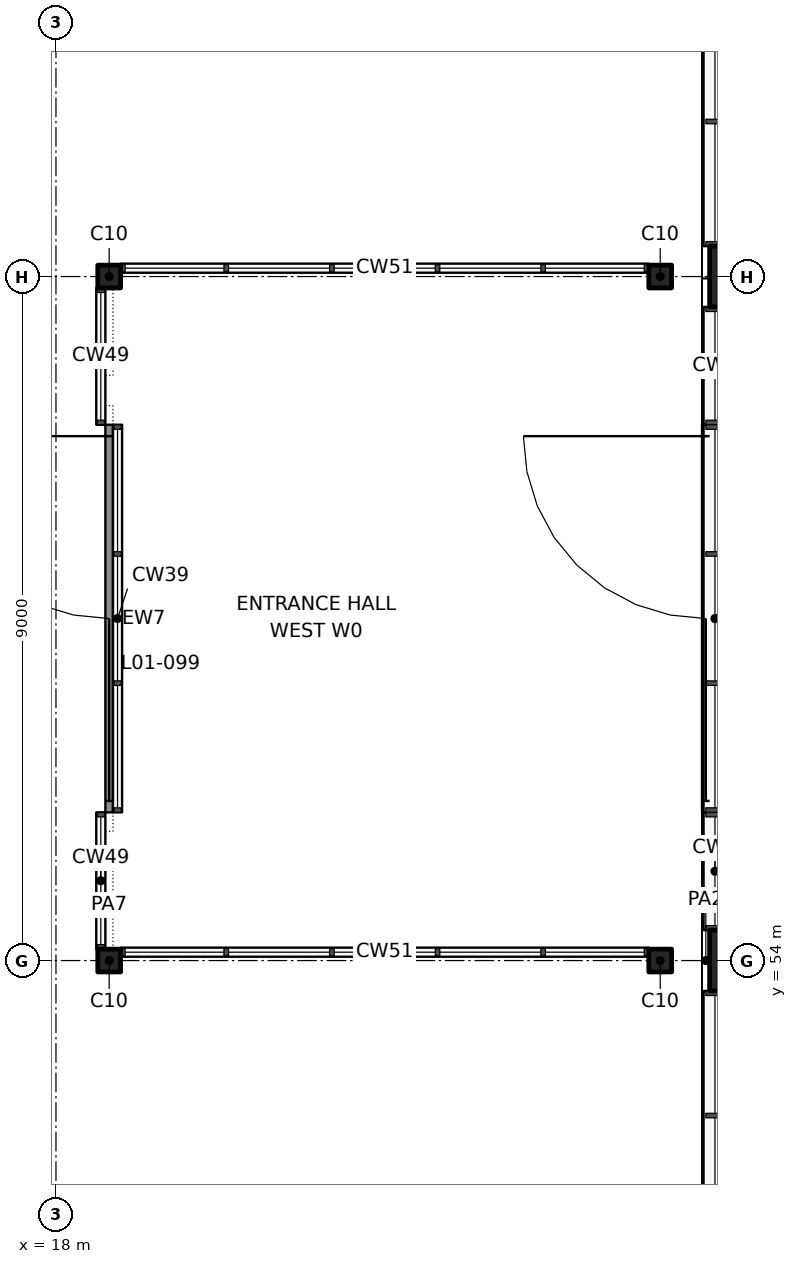
"""IFC4 building model, lengths in metres.
Left out: names, types, materials, properties, quantities, classifications, styles, units other than length and angle.
Written with IfcOpenShell. Run it as: python <this file> out.ifc"""

import sys

from ifc_helpers import new_model, si_unit, direction, frame, frame_2d, origin, origin_2d, place, context, subcontext, project, spatial, rectangle, hollow_rectangle, extrude, element, fill, save


model = new_model("IFC4")
c1 = context("Model", 3, precision=1e-05, world=origin(), true_north=direction((0.0, 1.0)))
c2 = subcontext(c1, "Body", "Model", "MODEL_VIEW")
j1 = project(units=[si_unit("LENGTHUNIT", "METRE"), si_unit("PLANEANGLEUNIT", "RADIAN")], contexts=[c1])
p1 = place(None, origin())
s1 = spatial("IfcSite", under=j1, at=p1, CompositionType="ELEMENT")
p2 = place(p1, origin())
s2 = spatial("IfcBuilding", under=s1, at=p2, CompositionType="ELEMENT")
p3 = place(p2, frame((0.0, 0.0, 7.0)))
s3 = spatial("IfcBuildingStorey", under=s2, at=p3, CompositionType="ELEMENT", Elevation=7.0)
for number, where, z_axis, x_axis in (
    (1, (27.0, 54.0, 0.0), (0.0, 0.0, 1.0), (1.0, 0.0, 0.0)),
    (2, (27.0, 63.0, 0.0), (0.0, 0.0, 1.0), (1.0, 0.0, 0.0)),
):
    element("IfcColumn", number, at=place(p3, frame(where, z_axis=z_axis, x_axis=x_axis)), inside=s3, PredefinedType="COLUMN", context=c2, shape_type="SweptSolid", body=[
        extrude(rectangle(XDim=0.8, YDim=0.8, at=origin_2d()), origin(), (0.0, 0.0, 1.0), 4.5),
    ])
p4 = place(p3, frame((26.55, 61.05, 0.0), z_axis=(0.0, 0.0, 1.0), x_axis=(0.0, -1.0, 0.0)))
e3 = element("IfcWall", 3, at=p4, inside=s3, PredefinedType="SOLIDWALL", context=c2, shape_type="SweptSolid", body=[
    extrude(rectangle(XDim=5.1, YDim=0.1, at=frame_2d((2.55, 0.0))), origin(), (0.0, 0.0, 1.0), 3.1),
])
p5 = place(p4, frame((0.15, 0.0, 0.0)))
e4 = element("IfcOpeningElement", 4, at=p5, cuts=e3, PredefinedType="OPENING", context=c2, shape_type="SweptSolid", body=[
    extrude(rectangle(XDim=4.8, YDim=2.7, at=frame_2d((2.4, 1.35))), frame((0.0, 0.06, 0.0), z_axis=(0.0, -1.0, 0.0), x_axis=(1.0, 0.0, 0.0)), (0.0, 0.0, 1.0), 0.12),
])
for number, where, z_axis, x_axis in (
    (5, (18.7, 54.0, 0.0), (0.0, 0.0, 1.0), (1.0, 0.0, 0.0)),
    (6, (25.95, 54.0, 0.0), (0.0, 0.0, 1.0), (1.0, 0.0, 0.0)),
    (7, (18.7, 63.0, 0.0), (0.0, 0.0, 1.0), (1.0, 0.0, 0.0)),
    (8, (25.95, 63.0, 0.0), (0.0, 0.0, 1.0), (1.0, 0.0, 0.0)),
):
    element("IfcColumn", number, at=place(p3, frame(where, z_axis=z_axis, x_axis=x_axis)), inside=s3, PredefinedType="COLUMN", context=c2, shape_type="SweptSolid", body=[
        extrude(hollow_rectangle(XDim=0.3, YDim=0.3, WallThickness=0.012, at=origin_2d()), origin(), (0.0, 0.0, 1.0), 4.5),
    ])
p6 = place(p3, frame((18.7, 61.05, 0.0), z_axis=(0.0, 0.0, 1.0), x_axis=(0.0, -1.0, 0.0)))
e9 = element("IfcWall", 9, at=p6, inside=s3, PredefinedType="SOLIDWALL", context=c2, shape_type="SweptSolid", body=[
    extrude(rectangle(XDim=5.1, YDim=0.1, at=frame_2d((2.55, 0.0))), origin(), (0.0, 0.0, 1.0), 3.1),
])
p7 = place(p6, frame((0.15, 0.0, 0.0)))
e10 = element("IfcOpeningElement", 10, at=p7, cuts=e9, PredefinedType="OPENING", context=c2, shape_type="SweptSolid", body=[
    extrude(rectangle(XDim=4.8, YDim=2.7, at=frame_2d((2.4, 1.35))), frame((0.0, 0.06, 0.0), z_axis=(0.0, -1.0, 0.0), x_axis=(1.0, 0.0, 0.0)), (0.0, 0.0, 1.0), 0.12),
])
p8 = place(p5, frame((4.8, 0.0, 0.0), z_axis=(0.0, 0.0, 1.0), x_axis=(-1.0, 0.0, 0.0)))
e11 = element("IfcDoor", 11, at=p8, inside=s3, OperationType="DOUBLE_DOOR_SINGLE_SWING", PredefinedType="DOOR", context=c2, shape_type="SweptSolid", body=[
    extrude(rectangle(XDim=4.8, YDim=2.7, at=frame_2d((2.4, 1.35))), frame((0.0, 0.025, 0.0), z_axis=(0.0, -1.0, 0.0), x_axis=(1.0, 0.0, 0.0)), (0.0, 0.0, 1.0), 0.05),
])
fill(e4, e11)
p9 = place(p7, frame((4.8, 0.0, 0.0), z_axis=(0.0, 0.0, 1.0), x_axis=(-1.0, 0.0, 0.0)))
e12 = element("IfcDoor", 12, at=p9, inside=s3, OperationType="DOUBLE_DOOR_SINGLE_SWING", PredefinedType="DOOR", context=c2, shape_type="SweptSolid", body=[
    extrude(rectangle(XDim=4.8, YDim=2.7, at=frame_2d((2.4, 1.35))), frame((0.0, 0.025, 0.0), z_axis=(0.0, -1.0, 0.0), x_axis=(1.0, 0.0, 0.0)), (0.0, 0.0, 1.0), 0.05),
])
fill(e10, e12)
save(model, sys.argv[1])
